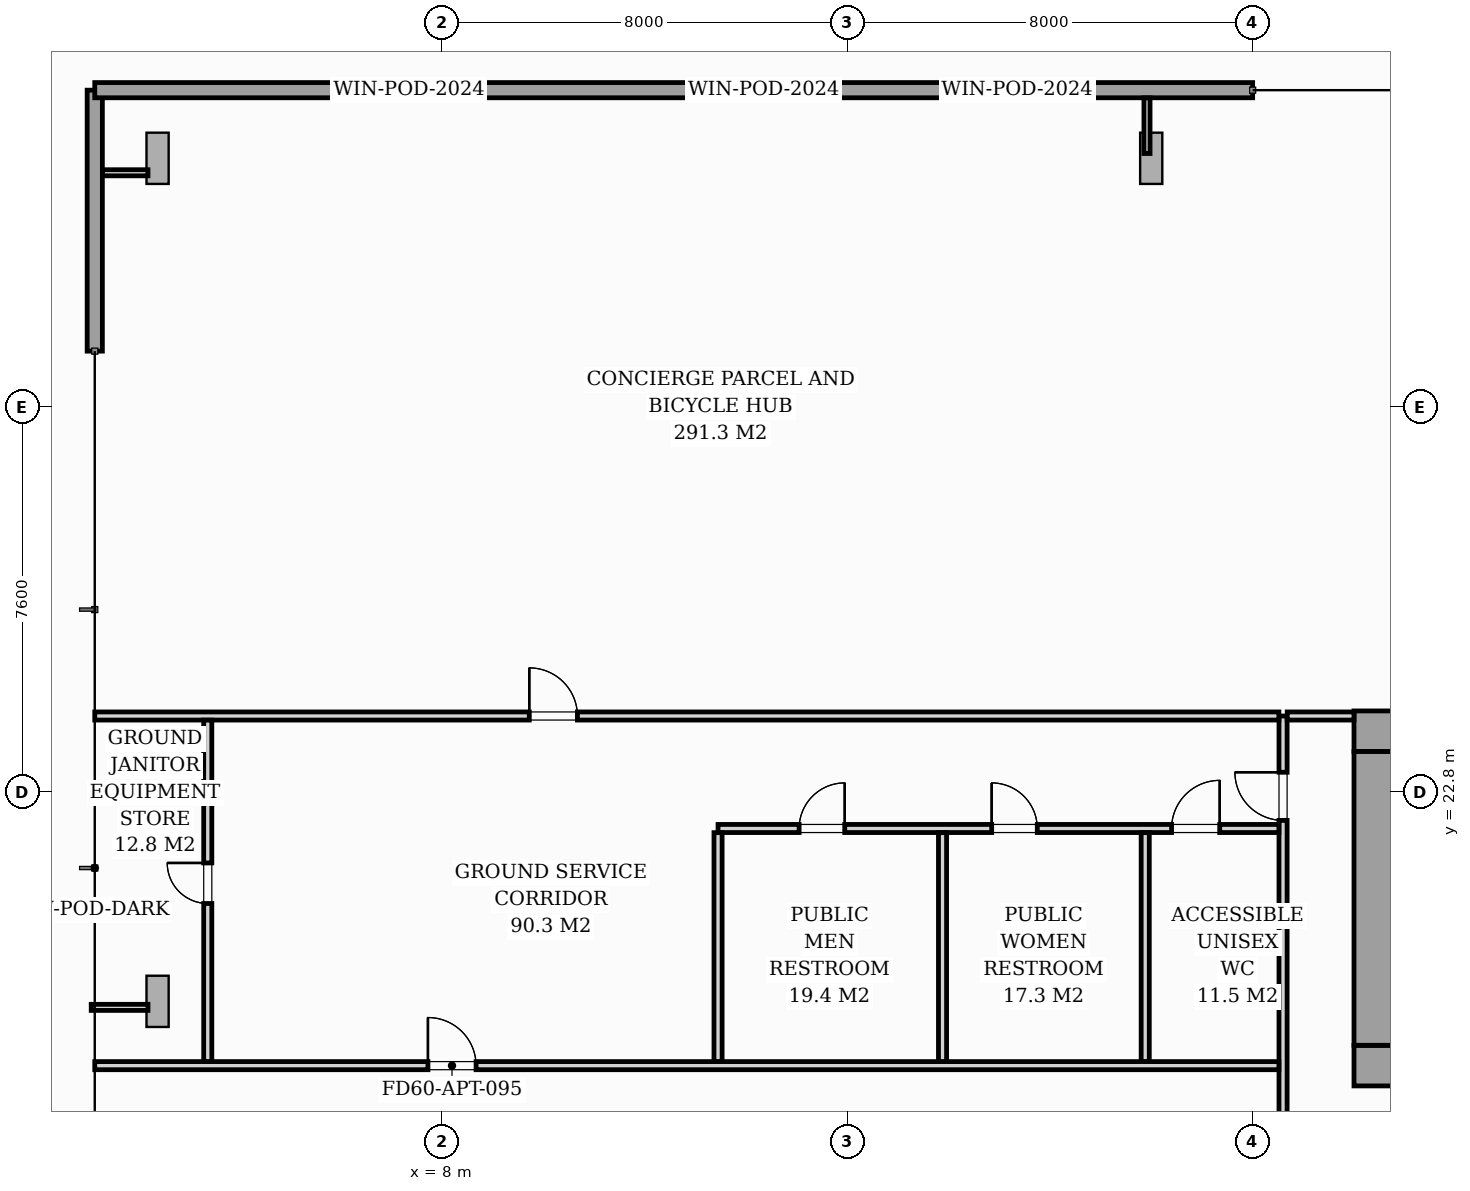
"""IFC4 building model, lengths in metres.
Left out: names, types, materials, properties, quantities, classifications, styles, units other than length and angle.
Written with IfcOpenShell. Run it as: python <this file> out.ifc"""

import sys

from ifc_helpers import new_model, si_unit, direction, frame, frame_2d, origin, origin_2d, place, context, subcontext, project, spatial, rectangle, i_section, extrude, source, transform, mapped, element, fill, save


model = new_model("IFC4")
c1 = context("Model", 3, precision=1e-05, world=origin(), true_north=direction((0.0, 1.0)))
c2 = subcontext(c1, "Body", "Model", "MODEL_VIEW")
j1 = project(units=[si_unit("LENGTHUNIT", "METRE"), si_unit("PLANEANGLEUNIT", "RADIAN")], contexts=[c1])
p1 = place(None, origin())
s1 = spatial("IfcSite", under=j1, at=p1, CompositionType="ELEMENT")
p2 = place(p1, origin())
s2 = spatial("IfcBuilding", under=s1, at=p2, CompositionType="ELEMENT")
p3 = place(p2, origin())
s3 = spatial("IfcBuildingStorey", under=s2, at=p3, CompositionType="ELEMENT", Elevation=0.0)
m1 = source(origin(), c2, "Body", "SweptSolid", [
    extrude(i_section(OverallWidth=0.437, OverallDepth=0.514, WebThickness=0.061, FlangeThickness=0.097, FilletRadius=0.018, at=origin_2d()), origin(), (0.0, 0.0, 1.0), 4.996),
])
for number, where, z_axis, x_axis in (
    (1, (26.4, 17.4, 0.002), (0.0, 0.0, 1.0), (1.0, 0.0, 0.0)),
    (2, (26.4, 24.0, 0.002), (0.0, 0.0, 1.0), (1.0, 0.0, 0.0)),
):
    element("IfcColumn", number, at=place(p3, frame(where, z_axis=z_axis, x_axis=x_axis)), inside=s3, PredefinedType="PILASTER", context=c2, shape_type="MappedRepresentation", body=[
        mapped(m1, transform((0.0, 0.0, 0.0), scale=1.0)),
    ])
m2 = source(origin(), c2, "Body", "SweptSolid", [
    extrude(i_section(OverallWidth=0.438, OverallDepth=1.011, WebThickness=0.041, FlangeThickness=0.074, FilletRadius=0.024, at=origin_2d()), origin(), (0.0, 0.0, 1.0), 4.639),
])
p4 = place(p3, frame((2.194, 35.6, 0.078), z_axis=(0.166567504436, -0.249930198598, 0.953829210233), x_axis=(-0.528973537524, 0.793711004645, 0.300349525895)))
e3 = element("IfcColumn", 3, at=p4, inside=s3, PredefinedType="COLUMN", context=c2, shape_type="MappedRepresentation", body=[
    mapped(m2, transform((0.0, 0.0, 0.0), scale=1.0)),
])
m3 = source(origin(), c2, "Body", "SweptSolid", [
    extrude(i_section(OverallWidth=0.438, OverallDepth=1.011, WebThickness=0.041, FlangeThickness=0.074, FilletRadius=0.024, at=origin_2d()), origin(), (0.0, 0.0, 1.0), 4.603),
])
p5 = place(p3, frame((22.085, 35.602, 0.07), z_axis=(-0.073719261537, -0.252766906826, 0.964714652782), x_axis=(0.270105178947, 0.926130419325, 0.263297623817)))
e4 = element("IfcColumn", 4, at=p5, inside=s3, PredefinedType="COLUMN", context=c2, shape_type="MappedRepresentation", body=[
    mapped(m3, transform((0.0, 0.0, 0.0), scale=1.0)),
])
m4 = source(origin(), c2, "Body", "SweptSolid", [
    extrude(i_section(OverallWidth=0.438, OverallDepth=1.011, WebThickness=0.041, FlangeThickness=0.074, FilletRadius=0.024, at=origin_2d()), origin(), (0.0, 0.0, 1.0), 4.562),
])
p6 = place(p3, frame((2.19, 18.794, 0.056), z_axis=(0.171106284993, -0.10693473801, 0.979432285073), x_axis=(-0.830571511647, 0.519074720135, 0.201773137353)))
e5 = element("IfcColumn", 5, at=p6, inside=s3, PredefinedType="COLUMN", context=c2, shape_type="MappedRepresentation", body=[
    mapped(m4, transform((0.0, 0.0, 0.0), scale=1.0)),
])
p7 = place(p3, frame((1.15, 31.5, 0.0), z_axis=(0.0, 0.0, 1.0), x_axis=(0.0, 1.0, 0.0)))
e6 = element("IfcWall", 6, at=p7, inside=s3, PredefinedType="STANDARD", context=c2, shape_type="SweptSolid", body=[
    extrude(rectangle(XDim=5.15, YDim=0.3, at=frame_2d((2.575, 0.0))), origin(), (0.0, 0.0, 1.0), 4.58),
])
p8 = place(p3, frame((1.15, 36.65, 0.0), z_axis=(0.0, 0.0, 1.0), x_axis=(1.0, 0.0, 0.0)))
e7 = element("IfcWall", 7, at=p8, inside=s3, PredefinedType="STANDARD", context=c2, shape_type="SweptSolid", body=[
    extrude(rectangle(XDim=22.85, YDim=0.3, at=frame_2d((11.425, 0.0))), origin(), (0.0, 0.0, 1.0), 4.58),
])
p9 = place(p8, frame((5.2, 0.0, 1.0)))
e8 = element("IfcOpeningElement", 8, at=p9, cuts=e7, PredefinedType="OPENING", context=c2, shape_type="SweptSolid", body=[
    extrude(rectangle(XDim=2.0, YDim=2.4, at=frame_2d((1.0, 1.2))), frame((0.0, 0.16, 0.0), z_axis=(0.0, -1.0, 0.0), x_axis=(1.0, 0.0, 0.0)), (0.0, 0.0, 1.0), 0.32),
])
p10 = place(p8, frame((12.2, 0.0, 1.0)))
e9 = element("IfcOpeningElement", 9, at=p10, cuts=e7, PredefinedType="OPENING", context=c2, shape_type="SweptSolid", body=[
    extrude(rectangle(XDim=2.0, YDim=2.4, at=frame_2d((1.0, 1.2))), frame((0.0, 0.16, 0.0), z_axis=(0.0, -1.0, 0.0), x_axis=(1.0, 0.0, 0.0)), (0.0, 0.0, 1.0), 0.32),
])
p11 = place(p8, frame((17.2, 0.0, 1.0)))
e10 = element("IfcOpeningElement", 10, at=p11, cuts=e7, PredefinedType="OPENING", context=c2, shape_type="SweptSolid", body=[
    extrude(rectangle(XDim=2.0, YDim=2.4, at=frame_2d((1.0, 1.2))), frame((0.0, 0.16, 0.0), z_axis=(0.0, -1.0, 0.0), x_axis=(1.0, 0.0, 0.0)), (0.0, 0.0, 1.0), 0.32),
])
p12 = place(p3, frame((26.0, 17.4, 0.0), z_axis=(0.0, 0.0, 1.0), x_axis=(1.0, 0.0, 0.0)))
e11 = element("IfcWall", 11, at=p12, inside=s3, PredefinedType="SHEAR", context=c2, shape_type="SweptSolid", body=[
    extrude(rectangle(XDim=20.0, YDim=0.8, at=frame_2d((10.0, 0.0))), origin(), (0.0, 0.0, 1.0), 5.0),
])
p13 = place(p12, frame((1.15, 0.0, 0.0)))
e12 = element("IfcOpeningElement", 12, at=p13, cuts=e11, PredefinedType="OPENING", context=c2, shape_type="SweptSolid", body=[
    extrude(rectangle(XDim=0.95, YDim=2.06, at=frame_2d((0.475, 1.03))), frame((0.0, 0.41, 0.0), z_axis=(0.0, -1.0, 0.0), x_axis=(1.0, 0.0, 0.0)), (0.0, 0.0, 1.0), 0.82),
])
p14 = place(p12, frame((9.58, 0.0, 0.0)))
e13 = element("IfcOpeningElement", 13, at=p14, cuts=e11, PredefinedType="OPENING", context=c2, shape_type="SweptSolid", body=[
    extrude(rectangle(XDim=0.9, YDim=2.06, at=frame_2d((0.45, 1.03))), frame((0.0, 0.41, 0.0), z_axis=(0.0, -1.0, 0.0), x_axis=(1.0, 0.0, 0.0)), (0.0, 0.0, 1.0), 0.82),
])
p15 = place(p12, frame((17.75, 0.0, 0.0)))
e14 = element("IfcOpeningElement", 14, at=p15, cuts=e11, PredefinedType="OPENING", context=c2, shape_type="SweptSolid", body=[
    extrude(rectangle(XDim=0.95, YDim=2.06, at=frame_2d((0.475, 1.03))), frame((0.0, 0.41, 0.0), z_axis=(0.0, -1.0, 0.0), x_axis=(1.0, 0.0, 0.0)), (0.0, 0.0, 1.0), 0.82),
])
p16 = place(p3, frame((26.0, 24.0, 0.0), z_axis=(0.0, 0.0, 1.0), x_axis=(1.0, 0.0, 0.0)))
e15 = element("IfcWall", 15, at=p16, inside=s3, PredefinedType="SHEAR", context=c2, shape_type="SweptSolid", body=[
    extrude(rectangle(XDim=20.0, YDim=0.8, at=frame_2d((10.0, 0.0))), origin(), (0.0, 0.0, 1.0), 5.0),
])
p17 = place(p3, frame((26.4, 17.802, 0.0), z_axis=(0.0, 0.0, 1.0), x_axis=(0.0, 1.0, 0.0)))
e16 = element("IfcWall", 16, at=p17, inside=s3, PredefinedType="SHEAR", context=c2, shape_type="SweptSolid", body=[
    extrude(rectangle(XDim=5.796, YDim=0.8, at=frame_2d((2.898, 0.0))), origin(), (0.0, 0.0, 1.0), 5.0),
])
p18 = place(p3, frame((24.6, 1.102, 0.0), z_axis=(0.0, 0.0, 1.0), x_axis=(0.0, 1.0, 0.0)))
e17 = element("IfcWall", 17, at=p18, inside=s3, PredefinedType="PARTITIONING", context=c2, shape_type="SweptSolid", body=[
    extrude(rectangle(XDim=23.198, YDim=0.16, at=frame_2d((11.599, 0.0))), origin(), (0.0, 0.0, 1.0), 4.58),
])
p19 = place(p18, frame((1.348, 0.0, 0.0)))
e18 = element("IfcOpeningElement", 18, at=p19, cuts=e17, PredefinedType="OPENING", context=c2, shape_type="SweptSolid", body=[
    extrude(rectangle(XDim=0.95, YDim=2.06, at=frame_2d((0.475, 1.03))), frame((0.0, 0.09, 0.0), z_axis=(0.0, -1.0, 0.0), x_axis=(1.0, 0.0, 0.0)), (0.0, 0.0, 1.0), 0.18),
])
p20 = place(p18, frame((9.348, 0.0, 0.0)))
e19 = element("IfcOpeningElement", 19, at=p20, cuts=e17, PredefinedType="OPENING", context=c2, shape_type="SweptSolid", body=[
    extrude(rectangle(XDim=1.2, YDim=2.08, at=frame_2d((0.6, 1.04))), frame((0.0, 0.09, 0.0), z_axis=(0.0, -1.0, 0.0), x_axis=(1.0, 0.0, 0.0)), (0.0, 0.0, 1.0), 0.18),
])
p21 = place(p18, frame((21.138, 0.0, 0.0)))
e20 = element("IfcOpeningElement", 20, at=p21, cuts=e17, PredefinedType="OPENING", context=c2, shape_type="SweptSolid", body=[
    extrude(rectangle(XDim=0.95, YDim=2.06, at=frame_2d((0.475, 1.03))), frame((0.0, 0.09, 0.0), z_axis=(0.0, -1.0, 0.0), x_axis=(1.0, 0.0, 0.0)), (0.0, 0.0, 1.0), 0.18),
])
p22 = place(p3, frame((1.15, 17.4, 0.0), z_axis=(0.0, 0.0, 1.0), x_axis=(1.0, 0.0, 0.0)))
e21 = element("IfcWall", 21, at=p22, inside=s3, PredefinedType="PARTITIONING", context=c2, shape_type="SweptSolid", body=[
    extrude(rectangle(XDim=23.368, YDim=0.16, at=frame_2d((11.684, 0.0))), origin(), (0.0, 0.0, 1.0), 3.536),
])
p23 = place(p22, frame((6.575, 0.0, 0.0)))
e22 = element("IfcOpeningElement", 22, at=p23, cuts=e21, PredefinedType="OPENING", context=c2, shape_type="SweptSolid", body=[
    extrude(rectangle(XDim=0.95, YDim=2.06, at=frame_2d((0.475, 1.03))), frame((0.0, 0.09, 0.0), z_axis=(0.0, -1.0, 0.0), x_axis=(1.0, 0.0, 0.0)), (0.0, 0.0, 1.0), 0.18),
])
p24 = place(p3, frame((13.45, 22.08, 0.0), z_axis=(0.0, 0.0, 1.0), x_axis=(1.0, 0.0, 0.0)))
e23 = element("IfcWall", 23, at=p24, inside=s3, PredefinedType="PARTITIONING", context=c2, shape_type="SweptSolid", body=[
    extrude(rectangle(XDim=11.068, YDim=0.16, at=frame_2d((5.534, 0.0))), origin(), (0.0, 0.0, 1.0), 4.58),
])
p25 = place(p24, frame((1.6, 0.0, 0.0)))
e24 = element("IfcOpeningElement", 24, at=p25, cuts=e23, PredefinedType="OPENING", context=c2, shape_type="SweptSolid", body=[
    extrude(rectangle(XDim=0.9, YDim=2.05, at=frame_2d((0.45, 1.025))), frame((0.0, 0.09, 0.0), z_axis=(0.0, -1.0, 0.0), x_axis=(1.0, 0.0, 0.0)), (0.0, 0.0, 1.0), 0.18),
])
p26 = place(p24, frame((5.4, 0.0, 0.0)))
e25 = element("IfcOpeningElement", 25, at=p26, cuts=e23, PredefinedType="OPENING", context=c2, shape_type="SweptSolid", body=[
    extrude(rectangle(XDim=0.9, YDim=2.05, at=frame_2d((0.45, 1.025))), frame((0.0, 0.09, 0.0), z_axis=(0.0, -1.0, 0.0), x_axis=(1.0, 0.0, 0.0)), (0.0, 0.0, 1.0), 0.18),
])
p27 = place(p24, frame((8.95, 0.0, 0.0)))
e26 = element("IfcOpeningElement", 26, at=p27, cuts=e23, PredefinedType="OPENING", context=c2, shape_type="SweptSolid", body=[
    extrude(rectangle(XDim=0.95, YDim=2.1, at=frame_2d((0.475, 1.05))), frame((0.0, 0.09, 0.0), z_axis=(0.0, -1.0, 0.0), x_axis=(1.0, 0.0, 0.0)), (0.0, 0.0, 1.0), 0.18),
])
p28 = place(p3, frame((1.15, 24.3, 0.0), z_axis=(0.0, 0.0, 1.0), x_axis=(1.0, 0.0, 0.0)))
e27 = element("IfcWall", 27, at=p28, inside=s3, PredefinedType="PARTITIONING", context=c2, shape_type="SweptSolid", body=[
    extrude(rectangle(XDim=23.368, YDim=0.16, at=frame_2d((11.684, 0.0))), origin(), (0.0, 0.0, 1.0), 4.58),
])
p29 = place(p28, frame((8.575, 0.0, 0.0)))
e28 = element("IfcOpeningElement", 28, at=p29, cuts=e27, PredefinedType="OPENING", context=c2, shape_type="SweptSolid", body=[
    extrude(rectangle(XDim=0.95, YDim=2.06, at=frame_2d((0.475, 1.03))), frame((0.0, 0.09, 0.0), z_axis=(0.0, -1.0, 0.0), x_axis=(1.0, 0.0, 0.0)), (0.0, 0.0, 1.0), 0.18),
])
p30 = place(p3, frame((24.682, 24.3, 0.0), z_axis=(0.0, 0.0, 1.0), x_axis=(1.0, 0.0, 0.0)))
e29 = element("IfcWall", 29, at=p30, inside=s3, PredefinedType="PARTITIONING", context=c2, shape_type="SweptSolid", body=[
    extrude(rectangle(XDim=1.318, YDim=0.16, at=frame_2d((0.659, 0.0))), origin(), (0.0, 0.0, 1.0), 4.58),
])
p31 = place(p3, frame((3.38, 17.482, 0.0), z_axis=(0.0, 0.0, 1.0), x_axis=(0.0, 1.0, 0.0)))
e30 = element("IfcWall", 30, at=p31, inside=s3, PredefinedType="PARTITIONING", context=c2, shape_type="SweptSolid", body=[
    extrude(rectangle(XDim=6.736, YDim=0.16, at=frame_2d((3.368, 0.0))), origin(), (0.0, 0.0, 1.0), 4.58),
])
p32 = place(p31, frame((3.118, 0.0, 0.0)))
e31 = element("IfcOpeningElement", 31, at=p32, cuts=e30, PredefinedType="OPENING", context=c2, shape_type="SweptSolid", body=[
    extrude(rectangle(XDim=0.8, YDim=2.05, at=frame_2d((0.4, 1.025))), frame((0.0, 0.09, 0.0), z_axis=(0.0, -1.0, 0.0), x_axis=(1.0, 0.0, 0.0)), (0.0, 0.0, 1.0), 0.18),
])
for number, where, z_axis, x_axis in (
    (32, (13.45, 17.482, 0.0), (0.0, 0.0, 1.0), (0.0, 1.0, 0.0)),
    (33, (17.88, 17.482, 0.0), (0.0, 0.0, 1.0), (0.0, 1.0, 0.0)),
    (34, (21.88, 17.482, 0.0), (0.0, 0.0, 1.0), (0.0, 1.0, 0.0)),
):
    element("IfcWall", number, at=place(p3, frame(where, z_axis=z_axis, x_axis=x_axis)), inside=s3, PredefinedType="PARTITIONING", context=c2, shape_type="SweptSolid", body=[
        extrude(rectangle(XDim=4.516, YDim=0.16, at=frame_2d((2.258, 0.0))), origin(), (0.0, 0.0, 1.0), 4.58),
    ])
p33 = place(p3, frame((2.2, 35.02, 0.0), z_axis=(0.0, 0.0, 1.0), x_axis=(-1.0, 0.0, 0.0)))
e35 = element("IfcWall", 35, at=p33, inside=s3, PredefinedType="PARTITIONING", context=c2, shape_type="SweptSolid", body=[
    extrude(rectangle(XDim=0.898, YDim=0.12, at=frame_2d((0.449, 0.0))), origin(), (0.0, 0.0, 1.0), 4.58),
])
p34 = place(p3, frame((21.915, 35.4, 0.0), z_axis=(0.0, 0.0, 1.0), x_axis=(0.0, 1.0, 0.0)))
e36 = element("IfcWall", 36, at=p34, inside=s3, PredefinedType="PARTITIONING", context=c2, shape_type="SweptSolid", body=[
    extrude(rectangle(XDim=1.098, YDim=0.12, at=frame_2d((0.549, 0.0))), origin(), (0.0, 0.0, 1.0), 4.58),
])
p35 = place(p3, frame((2.2, 18.55, 0.0), z_axis=(0.0, 0.0, 1.0), x_axis=(-1.0, 0.0, 0.0)))
e37 = element("IfcWall", 37, at=p35, inside=s3, PredefinedType="PARTITIONING", context=c2, shape_type="SweptSolid", body=[
    extrude(rectangle(XDim=1.12, YDim=0.12, at=frame_2d((0.56, 0.0))), origin(), (0.0, 0.0, 1.0), 4.58),
])
m5 = source(origin(), c2, "Body", "SweptSolid", [
    extrude(rectangle(XDim=2.0, YDim=2.4, at=frame_2d((1.0, 1.2))), frame((0.0, 0.03, 0.0), z_axis=(0.0, -1.0, 0.0), x_axis=(1.0, 0.0, 0.0)), (0.0, 0.0, 1.0), 0.06),
])
p36 = place(p9, origin())
e38 = element("IfcWindow", 38, at=p36, inside=s3, PartitioningType="SINGLE_PANEL", PredefinedType="WINDOW", context=c2, shape_type="MappedRepresentation", body=[
    mapped(m5, transform((0.0, 0.0, 0.0), scale=1.0)),
])
fill(e8, e38)
p37 = place(p10, origin())
e39 = element("IfcWindow", 39, at=p37, inside=s3, PartitioningType="SINGLE_PANEL", PredefinedType="WINDOW", context=c2, shape_type="MappedRepresentation", body=[
    mapped(m5, transform((0.0, 0.0, 0.0), scale=1.0)),
])
fill(e9, e39)
p38 = place(p11, origin())
e40 = element("IfcWindow", 40, at=p38, inside=s3, PartitioningType="SINGLE_PANEL", PredefinedType="WINDOW", context=c2, shape_type="MappedRepresentation", body=[
    mapped(m5, transform((0.0, 0.0, 0.0), scale=1.0)),
])
fill(e10, e40)
m6 = source(origin(), c2, "Body", "SweptSolid", [
    extrude(rectangle(XDim=0.95, YDim=2.06, at=frame_2d((0.475, 1.03))), frame((0.0, 0.025, 0.0), z_axis=(0.0, -1.0, 0.0), x_axis=(1.0, 0.0, 0.0)), (0.0, 0.0, 1.0), 0.05),
])
p39 = place(p23, origin())
e41 = element("IfcDoor", 41, at=p39, inside=s3, OperationType="SINGLE_SWING_LEFT", PredefinedType="DOOR", context=c2, shape_type="MappedRepresentation", body=[
    mapped(m6, transform((0.0, 0.0, 0.0), scale=1.0)),
])
fill(e22, e41)
p40 = place(p21, origin())
e42 = element("IfcDoor", 42, at=p40, inside=s3, OperationType="SINGLE_SWING_RIGHT", PredefinedType="DOOR", context=c2, shape_type="MappedRepresentation", body=[
    mapped(m6, transform((0.0, 0.0, 0.0), scale=1.0)),
])
fill(e20, e42)
m7 = source(origin(), c2, "Body", "SweptSolid", [
    extrude(rectangle(XDim=0.9, YDim=2.05, at=frame_2d((0.45, 1.025))), frame((0.0, 0.025, 0.0), z_axis=(0.0, -1.0, 0.0), x_axis=(1.0, 0.0, 0.0)), (0.0, 0.0, 1.0), 0.05),
])
p41 = place(p25, origin())
e43 = element("IfcDoor", 43, at=p41, inside=s3, OperationType="SINGLE_SWING_RIGHT", PredefinedType="DOOR", context=c2, shape_type="MappedRepresentation", body=[
    mapped(m7, transform((0.0, 0.0, 0.0), scale=1.0)),
])
fill(e24, e43)
p42 = place(p26, origin())
e44 = element("IfcDoor", 44, at=p42, inside=s3, OperationType="SINGLE_SWING_LEFT", PredefinedType="DOOR", context=c2, shape_type="MappedRepresentation", body=[
    mapped(m7, transform((0.0, 0.0, 0.0), scale=1.0)),
])
fill(e25, e44)
m8 = source(origin(), c2, "Body", "SweptSolid", [
    extrude(rectangle(XDim=0.95, YDim=2.1, at=frame_2d((0.475, 1.05))), frame((0.0, 0.025, 0.0), z_axis=(0.0, -1.0, 0.0), x_axis=(1.0, 0.0, 0.0)), (0.0, 0.0, 1.0), 0.05),
])
p43 = place(p27, origin())
e45 = element("IfcDoor", 45, at=p43, inside=s3, OperationType="SINGLE_SWING_RIGHT", PredefinedType="DOOR", context=c2, shape_type="MappedRepresentation", body=[
    mapped(m8, transform((0.0, 0.0, 0.0), scale=1.0)),
])
fill(e26, e45)
p44 = place(p29, origin())
e46 = element("IfcDoor", 46, at=p44, inside=s3, OperationType="SINGLE_SWING_LEFT", PredefinedType="DOOR", context=c2, shape_type="MappedRepresentation", body=[
    mapped(m6, transform((0.0, 0.0, 0.0), scale=1.0)),
])
fill(e28, e46)
m9 = source(origin(), c2, "Body", "SweptSolid", [
    extrude(rectangle(XDim=0.8, YDim=2.05, at=frame_2d((0.4, 1.025))), frame((0.0, 0.025, 0.0), z_axis=(0.0, -1.0, 0.0), x_axis=(1.0, 0.0, 0.0)), (0.0, 0.0, 1.0), 0.05),
])
p45 = place(p32, origin())
e47 = element("IfcDoor", 47, at=p45, inside=s3, OperationType="SINGLE_SWING_RIGHT", PredefinedType="DOOR", context=c2, shape_type="MappedRepresentation", body=[
    mapped(m9, transform((0.0, 0.0, 0.0), scale=1.0)),
])
fill(e31, e47)
save(model, sys.argv[1])
